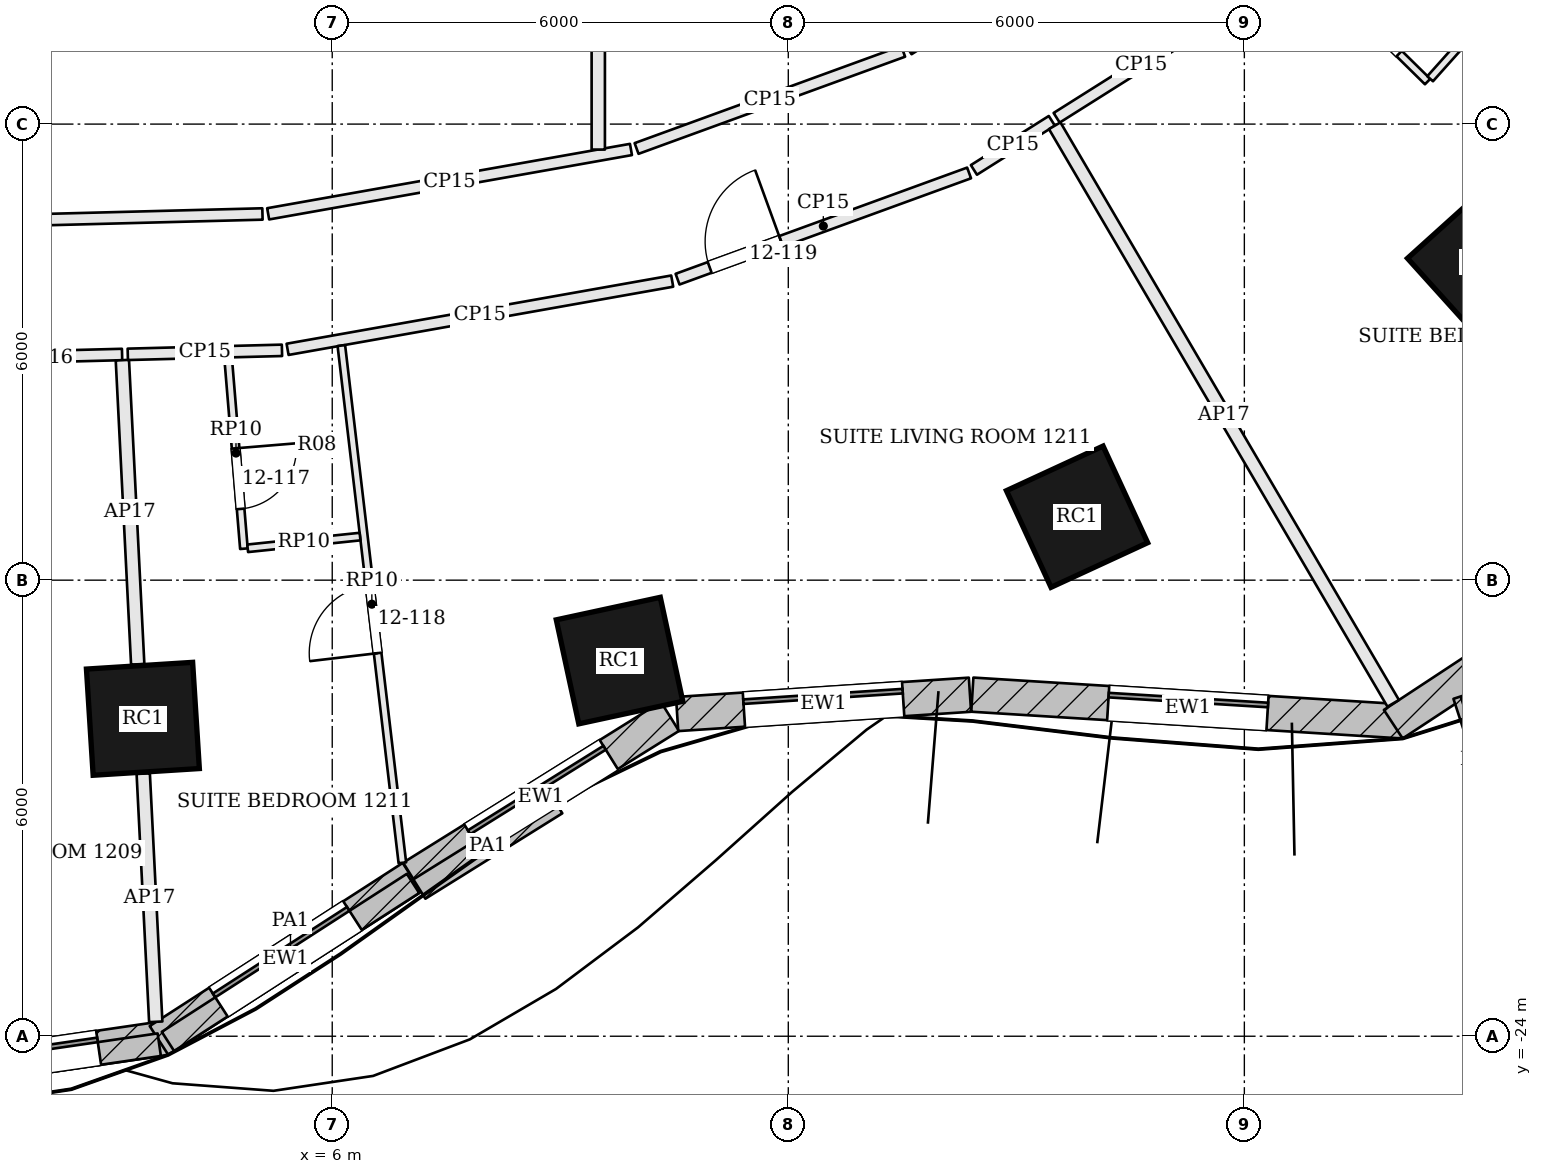
"""IFC4 building model, lengths in metres.
Left out: names, types, materials, properties, quantities, classifications, styles, units other than length and angle.
Written with IfcOpenShell. Run it as: python <this file> out.ifc"""

import sys

from ifc_helpers import new_model, si_unit, direction, frame, frame_2d, origin, origin_2d, place, context, subcontext, project, spatial, rectangle, extrude, element, fill, save


model = new_model("IFC4")
c1 = context("Model", 3, precision=1e-05, world=origin(), true_north=direction((0.0, 1.0)))
c2 = subcontext(c1, "Body", "Model", "MODEL_VIEW")
j1 = project(units=[si_unit("LENGTHUNIT", "METRE"), si_unit("PLANEANGLEUNIT", "RADIAN")], contexts=[c1])
p1 = place(None, origin())
s1 = spatial("IfcSite", under=j1, at=p1, CompositionType="ELEMENT")
p2 = place(p1, origin())
s2 = spatial("IfcBuilding", under=s1, at=p2, CompositionType="ELEMENT")
p3 = place(p2, frame((0.0, 0.0, 59.1)))
s3 = spatial("IfcBuildingStorey", under=s2, at=p3, CompositionType="ELEMENT", Elevation=59.1)
for number, where, z_axis, x_axis in (
    (1, (3.509, -19.824, 0.0), (0.0, 0.0, 1.0), (0.998, 0.063, 0.0)),
    (2, (9.78, -19.058, 0.0), (0.0, 0.0, 1.0), (0.977, 0.211, 0.0)),
    (3, (15.799, -17.165, 0.0), (0.0, 0.0, 1.0), (0.908, 0.419, 0.0)),
    (4, (21.135, -13.817, 0.0), (0.0, 0.0, 1.0), (0.743, 0.67, 0.0)),
):
    element("IfcColumn", number, at=place(p3, frame(where, z_axis=z_axis, x_axis=x_axis)), inside=s3, PredefinedType="COLUMN", context=c2, shape_type="SweptSolid", body=[
        extrude(rectangle(XDim=1.4, YDim=1.4, at=origin_2d()), origin(), (0.0, 0.0, 1.0), 3.6),
    ])
p4 = place(p3, frame((-0.032, -24.584, 0.0), z_axis=(0.0, 0.0, 1.0), x_axis=(0.989495330387, 0.144564833698, 0.0)))
e5 = element("IfcWall", 5, at=p4, inside=s3, PredefinedType="SOLIDWALL", context=c2, shape_type="SweptSolid", body=[
    extrude(rectangle(XDim=3.881, YDim=0.45, at=frame_2d((1.94, 0.0))), origin(), (0.0, 0.0, 1.0), 3.4),
])
p5 = place(p4, frame((0.89, 0.0, 0.9)))
e6 = element("IfcOpeningElement", 6, at=p5, cuts=e5, PredefinedType="OPENING", context=c2, shape_type="SweptSolid", body=[
    extrude(rectangle(XDim=2.1, YDim=2.0, at=frame_2d((1.05, 1.0))), frame((0.0, 0.235, 0.0), z_axis=(0.0, -1.0, 0.0), x_axis=(1.0, 0.0, 0.0)), (0.0, 0.0, 1.0), 0.47),
])
p6 = place(p3, frame((3.721, -24.055, 0.0), z_axis=(0.0, 0.0, 1.0), x_axis=(0.840404438766, 0.54195975801, 0.0)))
e7 = element("IfcWall", 7, at=p6, inside=s3, PredefinedType="SOLIDWALL", context=c2, shape_type="SweptSolid", body=[
    extrude(rectangle(XDim=3.96, YDim=0.45, at=frame_2d((1.98, 0.0))), origin(), (0.0, 0.0, 1.0), 3.4),
])
p7 = place(p6, frame((0.93, 0.0, 0.9)))
e8 = element("IfcOpeningElement", 8, at=p7, cuts=e7, PredefinedType="OPENING", context=c2, shape_type="SweptSolid", body=[
    extrude(rectangle(XDim=2.1, YDim=2.0, at=frame_2d((1.05, 1.0))), frame((0.0, 0.235, 0.0), z_axis=(0.0, -1.0, 0.0), x_axis=(1.0, 0.0, 0.0)), (0.0, 0.0, 1.0), 0.47),
])
p8 = place(p3, frame((7.052, -21.907, 0.0), z_axis=(0.0, 0.0, 1.0), x_axis=(0.848498976054, 0.529197021566, 0.0)))
e9 = element("IfcWall", 9, at=p8, inside=s3, PredefinedType="SOLIDWALL", context=c2, shape_type="SweptSolid", body=[
    extrude(rectangle(XDim=3.997, YDim=0.45, at=frame_2d((1.998, 0.0))), origin(), (0.0, 0.0, 1.0), 3.4),
])
p9 = place(p8, frame((0.948, 0.0, 0.9)))
e10 = element("IfcOpeningElement", 10, at=p9, cuts=e9, PredefinedType="OPENING", context=c2, shape_type="SweptSolid", body=[
    extrude(rectangle(XDim=2.1, YDim=2.0, at=frame_2d((1.05, 1.0))), frame((0.0, 0.235, 0.0), z_axis=(0.0, -1.0, 0.0), x_axis=(1.0, 0.0, 0.0)), (0.0, 0.0, 1.0), 0.47),
])
p10 = place(p3, frame((10.537, -19.761, 0.0), z_axis=(0.0, 0.0, 1.0), x_axis=(0.997831357874, 0.065822346084, 0.0)))
e11 = element("IfcWall", 11, at=p10, inside=s3, PredefinedType="SOLIDWALL", context=c2, shape_type="SweptSolid", body=[
    extrude(rectangle(XDim=3.861, YDim=0.45, at=frame_2d((1.931, 0.0))), origin(), (0.0, 0.0, 1.0), 3.4),
])
p11 = place(p10, frame((0.881, 0.0, 0.9)))
e12 = element("IfcOpeningElement", 12, at=p11, cuts=e11, PredefinedType="OPENING", context=c2, shape_type="SweptSolid", body=[
    extrude(rectangle(XDim=2.1, YDim=2.0, at=frame_2d((1.05, 1.0))), frame((0.0, 0.235, 0.0), z_axis=(0.0, -1.0, 0.0), x_axis=(1.0, 0.0, 0.0)), (0.0, 0.0, 1.0), 0.47),
])
p12 = place(p3, frame((14.421, -19.506, 0.0), z_axis=(0.0, 0.0, 1.0), x_axis=(0.998078573447, -0.06196096534, 0.0)))
e13 = element("IfcWall", 13, at=p12, inside=s3, PredefinedType="SOLIDWALL", context=c2, shape_type="SweptSolid", body=[
    extrude(rectangle(XDim=5.682, YDim=0.45, at=frame_2d((2.841, 0.0))), origin(), (0.0, 0.0, 1.0), 3.4),
])
p13 = place(p12, frame((1.791, 0.0, 0.9)))
e14 = element("IfcOpeningElement", 14, at=p13, cuts=e13, PredefinedType="OPENING", context=c2, shape_type="SweptSolid", body=[
    extrude(rectangle(XDim=2.1, YDim=2.0, at=frame_2d((1.05, 1.0))), frame((0.0, 0.235, 0.0), z_axis=(0.0, -1.0, 0.0), x_axis=(1.0, 0.0, 0.0)), (0.0, 0.0, 1.0), 0.47),
])
p14 = place(p3, frame((19.959, -19.895, 0.0), z_axis=(0.0, 0.0, 1.0), x_axis=(0.835201398752, 0.549944200372, 0.0)))
e15 = element("IfcWall", 15, at=p14, inside=s3, PredefinedType="SOLIDWALL", context=c2, shape_type="SweptSolid", body=[
    extrude(rectangle(XDim=4.748, YDim=0.45, at=frame_2d((2.374, 0.0))), origin(), (0.0, 0.0, 1.0), 3.4),
])
p15 = place(p14, frame((1.324, 0.0, 0.9)))
e16 = element("IfcOpeningElement", 16, at=p15, cuts=e15, PredefinedType="OPENING", context=c2, shape_type="SweptSolid", body=[
    extrude(rectangle(XDim=2.1, YDim=2.0, at=frame_2d((1.05, 1.0))), frame((0.0, 0.235, 0.0), z_axis=(0.0, -1.0, 0.0), x_axis=(1.0, 0.0, 0.0)), (0.0, 0.0, 1.0), 0.47),
])
p16 = place(p3, frame((20.846, -19.53, 0.0), z_axis=(0.0, 0.0, 1.0), x_axis=(0.309732726603, -0.950823662974, 0.0)))
e17 = element("IfcWall", 17, at=p16, inside=s3, PredefinedType="SOLIDWALL", context=c2, shape_type="SweptSolid", body=[
    extrude(rectangle(XDim=1.75, YDim=0.2, at=frame_2d((0.875, 0.0))), origin(), (0.0, 0.0, 1.0), 3.4),
])
p17 = place(p3, frame((0.091, -24.642, 3.6), z_axis=(0.0, 0.0, 1.0), x_axis=(0.989499132051, 0.144538810259, 0.0)))
e18 = element("IfcWall", 18, at=p17, inside=s3, PredefinedType="PARAPET", context=c2, shape_type="SweptSolid", body=[
    extrude(rectangle(XDim=3.672, YDim=0.3, at=frame_2d((1.836, 0.0))), origin(), (0.0, 0.0, 1.0), 1.1),
])
p18 = place(p3, frame((3.839, -24.068, 3.6), z_axis=(0.0, 0.0, 1.0), x_axis=(0.84044157539, 0.541902166776, 0.0)))
e19 = element("IfcWall", 19, at=p18, inside=s3, PredefinedType="PARAPET", context=c2, shape_type="SweptSolid", body=[
    extrude(rectangle(XDim=3.836, YDim=0.3, at=frame_2d((1.918, 0.0))), origin(), (0.0, 0.0, 1.0), 1.1),
])
p19 = place(p3, frame((7.146, -22.064, 3.6), z_axis=(0.0, 0.0, 1.0), x_axis=(0.848488829337, 0.529213290168, 0.0)))
e20 = element("IfcWall", 20, at=p19, inside=s3, PredefinedType="PARAPET", context=c2, shape_type="SweptSolid", body=[
    extrude(rectangle(XDim=2.124, YDim=0.3, at=frame_2d((1.062, 0.0))), origin(), (0.0, 0.0, 1.0), 1.1),
])
p20 = place(p3, frame((-2.114, -15.17, 0.0), z_axis=(0.0, 0.0, 1.0), x_axis=(0.99966176809, 0.02600671875, 0.0)))
e21 = element("IfcWall", 21, at=p20, inside=s3, PredefinedType="PARTITIONING", context=c2, shape_type="SweptSolid", body=[
    extrude(rectangle(XDim=5.351, YDim=0.15, at=frame_2d((2.675, 0.0))), origin(), (0.0, 0.0, 1.0), 2.68),
])
p21 = place(p20, frame((3.26, 0.0, 0.0)))
e22 = element("IfcOpeningElement", 22, at=p21, cuts=e21, PredefinedType="OPENING", context=c2, shape_type="SweptSolid", body=[
    extrude(rectangle(XDim=1.0, YDim=2.1, at=frame_2d((0.5, 1.05))), frame((0.0, 0.085, 0.0), z_axis=(0.0, -1.0, 0.0), x_axis=(1.0, 0.0, 0.0)), (0.0, 0.0, 1.0), 0.17),
])
p22 = place(p3, frame((3.678, -23.81, 0.0), z_axis=(0.0, 0.0, 1.0), x_axis=(-0.050406902628, 0.998728764063, 0.0)))
e23 = element("IfcWall", 23, at=p22, inside=s3, PredefinedType="PARTITIONING", context=c2, shape_type="SweptSolid", body=[
    extrude(rectangle(XDim=3.269, YDim=0.175, at=frame_2d((1.635, 0.0))), origin(), (0.0, 0.0, 1.0), 2.68),
])
p23 = place(p3, frame((3.441, -19.107, 0.0), z_axis=(0.0, 0.0, 1.0), x_axis=(-0.050399621173, 0.998729131539, 0.0)))
e24 = element("IfcWall", 24, at=p23, inside=s3, PredefinedType="PARTITIONING", context=c2, shape_type="SweptSolid", body=[
    extrude(rectangle(XDim=4.006, YDim=0.175, at=frame_2d((2.003, 0.0))), origin(), (0.0, 0.0, 1.0), 2.68),
])
p24 = place(p3, frame((3.31, -15.029, 0.0), z_axis=(0.0, 0.0, 1.0), x_axis=(0.99966219628, 0.025990254501, 0.0)))
e25 = element("IfcWall", 25, at=p24, inside=s3, PredefinedType="PARTITIONING", context=c2, shape_type="SweptSolid", body=[
    extrude(rectangle(XDim=2.029, YDim=0.15, at=frame_2d((1.015, 0.0))), origin(), (0.0, 0.0, 1.0), 2.68),
])
p25 = place(p3, frame((5.413, -14.963, 0.0), z_axis=(0.0, 0.0, 1.0), x_axis=(0.984633017555, 0.174636252655, 0.0)))
e26 = element("IfcWall", 26, at=p25, inside=s3, PredefinedType="PARTITIONING", context=c2, shape_type="SweptSolid", body=[
    extrude(rectangle(XDim=5.139, YDim=0.15, at=frame_2d((2.569, 0.0))), origin(), (0.0, 0.0, 1.0), 2.68),
])
p26 = place(p3, frame((10.543, -14.04, 0.0), z_axis=(0.0, 0.0, 1.0), x_axis=(0.939576705301, 0.342338450741, 0.0)))
e27 = element("IfcWall", 27, at=p26, inside=s3, PredefinedType="PARTITIONING", context=c2, shape_type="SweptSolid", body=[
    extrude(rectangle(XDim=4.082, YDim=0.15, at=frame_2d((2.041, 0.0))), origin(), (0.0, 0.0, 1.0), 2.68),
])
p27 = place(p26, frame((0.45, 0.0, 0.0)))
e28 = element("IfcOpeningElement", 28, at=p27, cuts=e27, PredefinedType="OPENING", context=c2, shape_type="SweptSolid", body=[
    extrude(rectangle(XDim=1.0, YDim=2.1, at=frame_2d((0.5, 1.05))), frame((0.0, 0.085, 0.0), z_axis=(0.0, -1.0, 0.0), x_axis=(1.0, 0.0, 0.0)), (0.0, 0.0, 1.0), 0.17),
])
p28 = place(p3, frame((14.442, -12.603, 0.0), z_axis=(0.0, 0.0, 1.0), x_axis=(0.845976983642, 0.533219413701, 0.0)))
e29 = element("IfcWall", 29, at=p28, inside=s3, PredefinedType="PARTITIONING", context=c2, shape_type="SweptSolid", body=[
    extrude(rectangle(XDim=1.211, YDim=0.15, at=frame_2d((0.606, 0.0))), origin(), (0.0, 0.0, 1.0), 2.68),
])
p29 = place(p3, frame((19.958, -19.62, 0.0), z_axis=(0.0, 0.0, 1.0), x_axis=(-0.505643381875, 0.862742586387, 0.0)))
e30 = element("IfcWall", 30, at=p29, inside=s3, PredefinedType="PARTITIONING", context=c2, shape_type="SweptSolid", body=[
    extrude(rectangle(XDim=8.808, YDim=0.175, at=frame_2d((4.404, 0.0))), origin(), (0.0, 0.0, 1.0), 2.68),
])
p30 = place(p3, frame((15.531, -11.917, 0.0), z_axis=(0.0, 0.0, 1.0), x_axis=(0.84600940038, 0.533167979598, 0.0)))
e31 = element("IfcWall", 31, at=p30, inside=s3, PredefinedType="PARTITIONING", context=c2, shape_type="SweptSolid", body=[
    extrude(rectangle(XDim=2.628, YDim=0.15, at=frame_2d((1.314, 0.0))), origin(), (0.0, 0.0, 1.0), 2.68),
])
p31 = place(p3, frame((16.517, -9.167, 0.0), z_axis=(0.0, 0.0, 1.0), x_axis=(-0.846000117603, -0.533182708849, 0.0)))
e32 = element("IfcWall", 32, at=p31, inside=s3, PredefinedType="PARTITIONING", context=c2, shape_type="SweptSolid", body=[
    extrude(rectangle(XDim=3.47, YDim=0.15, at=frame_2d((1.735, 0.0))), origin(), (0.0, 0.0, 1.0), 2.68),
])
p32 = place(p3, frame((13.511, -11.043, 0.0), z_axis=(0.0, 0.0, 1.0), x_axis=(-0.939583191704, -0.342320647736, 0.0)))
e33 = element("IfcWall", 33, at=p32, inside=s3, PredefinedType="PARTITIONING", context=c2, shape_type="SweptSolid", body=[
    extrude(rectangle(XDim=3.733, YDim=0.15, at=frame_2d((1.866, 0.0))), origin(), (0.0, 0.0, 1.0), 2.68),
])
p33 = place(p3, frame((9.93, -12.334, 0.0), z_axis=(0.0, 0.0, 1.0), x_axis=(-0.984638212434, -0.174606960386, 0.0)))
e34 = element("IfcWall", 34, at=p33, inside=s3, PredefinedType="PARTITIONING", context=c2, shape_type="SweptSolid", body=[
    extrude(rectangle(XDim=4.848, YDim=0.15, at=frame_2d((2.424, 0.0))), origin(), (0.0, 0.0, 1.0), 2.68),
])
p34 = place(p3, frame((5.082, -13.182, 0.0), z_axis=(0.0, 0.0, 1.0), x_axis=(-0.999661624383, -0.026012242045, 0.0)))
e35 = element("IfcWall", 35, at=p34, inside=s3, PredefinedType="PARTITIONING", context=c2, shape_type="SweptSolid", body=[
    extrude(rectangle(XDim=7.218, YDim=0.15, at=frame_2d((3.609, 0.0))), origin(), (0.0, 0.0, 1.0), 2.68),
])
p35 = place(p3, frame((6.923, -21.718, 0.0), z_axis=(0.0, 0.0, 1.0), x_axis=(-0.117159623324, 0.993113096612, 0.0)))
e36 = element("IfcWall", 36, at=p35, inside=s3, PredefinedType="PARTITIONING", context=c2, shape_type="SweptSolid", body=[
    extrude(rectangle(XDim=6.852, YDim=0.1, at=frame_2d((3.426, 0.0))), origin(), (0.0, 0.0, 1.0), 2.898),
])
p36 = place(p35, frame((2.777, 0.0, 0.0)))
e37 = element("IfcOpeningElement", 37, at=p36, cuts=e36, PredefinedType="OPENING", context=c2, shape_type="SweptSolid", body=[
    extrude(rectangle(XDim=0.9, YDim=2.4, at=frame_2d((0.45, 1.2))), frame((0.0, 0.06, 0.0), z_axis=(0.0, -1.0, 0.0), x_axis=(1.0, 0.0, 0.0)), (0.0, 0.0, 1.0), 0.12),
])
p37 = place(p3, frame((4.63, -15.07, 0.0), z_axis=(0.0, 0.0, 1.0), x_axis=(0.08247732406, -0.996592941484, 0.0)))
e38 = element("IfcWall", 38, at=p37, inside=s3, PredefinedType="PARTITIONING", context=c2, shape_type="SweptSolid", body=[
    extrude(rectangle(XDim=2.525, YDim=0.1, at=frame_2d((1.262, 0.0))), origin(), (0.0, 0.0, 1.0), 2.898),
])
p38 = place(p37, frame((1.2, 0.0, 0.0)))
e39 = element("IfcOpeningElement", 39, at=p38, cuts=e38, PredefinedType="OPENING", context=c2, shape_type="SweptSolid", body=[
    extrude(rectangle(XDim=0.8, YDim=2.1, at=frame_2d((0.4, 1.05))), frame((0.0, 0.06, 0.0), z_axis=(0.0, -1.0, 0.0), x_axis=(1.0, 0.0, 0.0)), (0.0, 0.0, 1.0), 0.12),
])
p39 = place(p3, frame((4.888, -17.581, 0.0), z_axis=(0.0, 0.0, 1.0), x_axis=(0.994596876319, 0.103812588907, 0.0)))
e40 = element("IfcWall", 40, at=p39, inside=s3, PredefinedType="PARTITIONING", context=c2, shape_type="SweptSolid", body=[
    extrude(rectangle(XDim=1.486, YDim=0.1, at=frame_2d((0.743, 0.0))), origin(), (0.0, 0.0, 1.0), 2.898),
])
p40 = place(p3, frame((24.996, -12.871, 0.0), z_axis=(0.0, 0.0, 1.0), x_axis=(-0.779382782797, 0.626548065099, 0.0)))
e41 = element("IfcWall", 41, at=p40, inside=s3, PredefinedType="PARTITIONING", context=c2, shape_type="SweptSolid", body=[
    extrude(rectangle(XDim=6.902, YDim=0.1, at=frame_2d((3.451, 0.0))), origin(), (0.0, 0.0, 1.0), 2.898),
])
p41 = place(p40, frame((2.828, 0.0, 0.0)))
e42 = element("IfcOpeningElement", 42, at=p41, cuts=e41, PredefinedType="OPENING", context=c2, shape_type="SweptSolid", body=[
    extrude(rectangle(XDim=0.9, YDim=2.4, at=frame_2d((0.45, 1.2))), frame((0.0, 0.06, 0.0), z_axis=(0.0, -1.0, 0.0), x_axis=(1.0, 0.0, 0.0)), (0.0, 0.0, 1.0), 0.12),
])
p42 = place(p3, frame((18.611, -9.67, 0.0), z_axis=(0.0, 0.0, 1.0), x_axis=(0.712836736893, -0.701330012573, 0.0)))
e43 = element("IfcWall", 43, at=p42, inside=s3, PredefinedType="PARTITIONING", context=c2, shape_type="SweptSolid", body=[
    extrude(rectangle(XDim=2.525, YDim=0.1, at=frame_2d((1.262, 0.0))), origin(), (0.0, 0.0, 1.0), 2.898),
])
p43 = place(p42, frame((1.2, 0.0, 0.0)))
e44 = element("IfcOpeningElement", 44, at=p43, cuts=e43, PredefinedType="OPENING", context=c2, shape_type="SweptSolid", body=[
    extrude(rectangle(XDim=0.8, YDim=2.1, at=frame_2d((0.4, 1.05))), frame((0.0, 0.06, 0.0), z_axis=(0.0, -1.0, 0.0), x_axis=(1.0, 0.0, 0.0)), (0.0, 0.0, 1.0), 0.12),
])
p44 = place(p3, frame((20.444, -11.403, 0.0), z_axis=(0.0, 0.0, 1.0), x_axis=(0.666369249882, 0.745621903388, 0.0)))
e45 = element("IfcWall", 45, at=p44, inside=s3, PredefinedType="PARTITIONING", context=c2, shape_type="SweptSolid", body=[
    extrude(rectangle(XDim=1.66, YDim=0.1, at=frame_2d((0.83, 0.0))), origin(), (0.0, 0.0, 1.0), 2.898),
])
p45 = place(p3, frame((9.5, -12.335, 0.0), z_axis=(0.0, 0.0, 1.0), x_axis=(0.0, 1.0, 0.0)))
e46 = element("IfcWall", 46, at=p45, inside=s3, PredefinedType="PARTITIONING", context=c2, shape_type="SweptSolid", body=[
    extrude(rectangle(XDim=7.46, YDim=0.175, at=frame_2d((3.73, 0.0))), origin(), (0.0, 0.0, 1.0), 2.68),
])
p46 = place(p5, origin())
e47 = element("IfcWindow", 47, at=p46, inside=s3, PartitioningType="SINGLE_PANEL", PredefinedType="WINDOW", context=c2, shape_type="SweptSolid", body=[
    extrude(rectangle(XDim=2.1, YDim=2.0, at=frame_2d((1.05, 1.0))), frame((0.0, 0.135, 0.0), z_axis=(0.0, -1.0, 0.0), x_axis=(1.0, 0.0, 0.0)), (0.0, 0.0, 1.0), 0.06),
])
fill(e6, e47)
p47 = place(p7, origin())
e48 = element("IfcWindow", 48, at=p47, inside=s3, PartitioningType="SINGLE_PANEL", PredefinedType="WINDOW", context=c2, shape_type="SweptSolid", body=[
    extrude(rectangle(XDim=2.1, YDim=2.0, at=frame_2d((1.05, 1.0))), frame((0.0, 0.135, 0.0), z_axis=(0.0, -1.0, 0.0), x_axis=(1.0, 0.0, 0.0)), (0.0, 0.0, 1.0), 0.06),
])
fill(e8, e48)
p48 = place(p9, origin())
e49 = element("IfcWindow", 49, at=p48, inside=s3, PartitioningType="SINGLE_PANEL", PredefinedType="WINDOW", context=c2, shape_type="SweptSolid", body=[
    extrude(rectangle(XDim=2.1, YDim=2.0, at=frame_2d((1.05, 1.0))), frame((0.0, 0.135, 0.0), z_axis=(0.0, -1.0, 0.0), x_axis=(1.0, 0.0, 0.0)), (0.0, 0.0, 1.0), 0.06),
])
fill(e10, e49)
p49 = place(p11, origin())
e50 = element("IfcWindow", 50, at=p49, inside=s3, PartitioningType="SINGLE_PANEL", PredefinedType="WINDOW", context=c2, shape_type="SweptSolid", body=[
    extrude(rectangle(XDim=2.1, YDim=2.0, at=frame_2d((1.05, 1.0))), frame((0.0, 0.135, 0.0), z_axis=(0.0, -1.0, 0.0), x_axis=(1.0, 0.0, 0.0)), (0.0, 0.0, 1.0), 0.06),
])
fill(e12, e50)
p50 = place(p13, origin())
e51 = element("IfcWindow", 51, at=p50, inside=s3, PartitioningType="SINGLE_PANEL", PredefinedType="WINDOW", context=c2, shape_type="SweptSolid", body=[
    extrude(rectangle(XDim=2.1, YDim=2.0, at=frame_2d((1.05, 1.0))), frame((0.0, 0.135, 0.0), z_axis=(0.0, -1.0, 0.0), x_axis=(1.0, 0.0, 0.0)), (0.0, 0.0, 1.0), 0.06),
])
fill(e14, e51)
p51 = place(p38, origin())
e52 = element("IfcDoor", 52, at=p51, inside=s3, OperationType="SINGLE_SWING_LEFT", PredefinedType="DOOR", context=c2, shape_type="SweptSolid", body=[
    extrude(rectangle(XDim=0.8, YDim=2.1, at=frame_2d((0.4, 1.05))), frame((0.0, 0.025, 0.0), z_axis=(0.0, -1.0, 0.0), x_axis=(1.0, 0.0, 0.0)), (0.0, 0.0, 1.0), 0.05),
])
fill(e39, e52)
p52 = place(p36, origin())
e53 = element("IfcDoor", 53, at=p52, inside=s3, OperationType="SINGLE_SWING_LEFT", PredefinedType="DOOR", context=c2, shape_type="SweptSolid", body=[
    extrude(rectangle(XDim=0.9, YDim=2.4, at=frame_2d((0.45, 1.2))), frame((0.0, 0.025, 0.0), z_axis=(0.0, -1.0, 0.0), x_axis=(1.0, 0.0, 0.0)), (0.0, 0.0, 1.0), 0.05),
])
fill(e37, e53)
p53 = place(p27, origin())
e54 = element("IfcDoor", 54, at=p53, inside=s3, OperationType="SINGLE_SWING_RIGHT", PredefinedType="DOOR", context=c2, shape_type="SweptSolid", body=[
    extrude(rectangle(XDim=1.0, YDim=2.1, at=frame_2d((0.5, 1.05))), frame((0.0, 0.025, 0.0), z_axis=(0.0, -1.0, 0.0), x_axis=(1.0, 0.0, 0.0)), (0.0, 0.0, 1.0), 0.05),
])
fill(e28, e54)
p54 = place(p43, origin())
e55 = element("IfcDoor", 55, at=p54, inside=s3, OperationType="SINGLE_SWING_LEFT", PredefinedType="DOOR", context=c2, shape_type="SweptSolid", body=[
    extrude(rectangle(XDim=0.8, YDim=2.1, at=frame_2d((0.4, 1.05))), frame((0.0, 0.025, 0.0), z_axis=(0.0, -1.0, 0.0), x_axis=(1.0, 0.0, 0.0)), (0.0, 0.0, 1.0), 0.05),
])
fill(e44, e55)
save(model, sys.argv[1])
